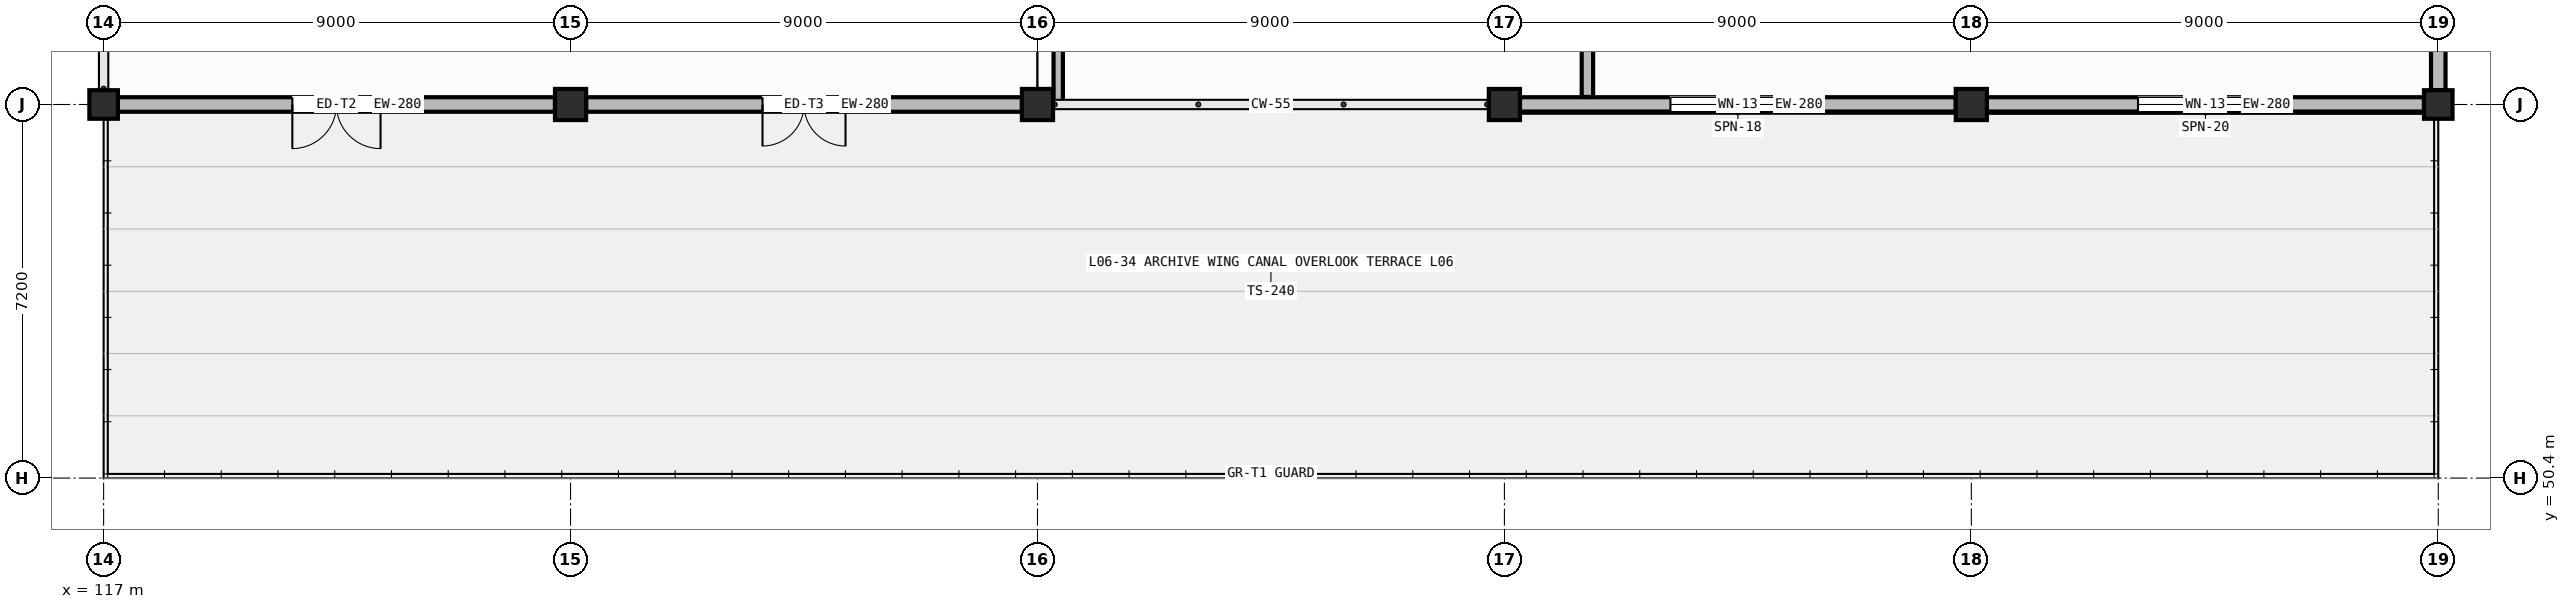
"""IFC4 building model, lengths in metres.
Left out: names, types, materials, properties, quantities, classifications, styles, units other than length and angle.
Written with IfcOpenShell. Run it as: python <this file> out.ifc"""

import sys

from ifc_helpers import new_model, si_unit, direction, frame, frame_2d, origin, origin_2d, place, context, subcontext, project, spatial, rectangle, hollow_rectangle, extrude, element, fill, save


model = new_model("IFC4")
c1 = context("Model", 3, precision=1e-05, world=origin(), true_north=direction((0.0, 1.0)))
c2 = subcontext(c1, "Body", "Model", "MODEL_VIEW")
j1 = project(units=[si_unit("LENGTHUNIT", "METRE"), si_unit("PLANEANGLEUNIT", "RADIAN")], contexts=[c1])
p1 = place(None, origin())
s1 = spatial("IfcSite", under=j1, at=p1, CompositionType="ELEMENT")
p2 = place(p1, origin())
s2 = spatial("IfcBuilding", under=s1, at=p2, CompositionType="ELEMENT")
p3 = place(p2, frame((0.0, 0.0, 20.6)))
s3 = spatial("IfcBuildingStorey", under=s2, at=p3, CompositionType="ELEMENT", Elevation=20.6)
p4 = place(p3, frame((117.0, 57.6, 0.0), z_axis=(0.0, 0.0, 1.0), x_axis=(1.0, 0.0, 0.0)))
e1 = element("IfcColumn", 1, at=p4, inside=s3, PredefinedType="COLUMN", context=c2, shape_type="SweptSolid", body=[
    extrude(hollow_rectangle(XDim=0.55, YDim=0.55, WallThickness=0.022, at=origin_2d()), origin(), (0.0, 0.0, 1.0), 3.36),
])
for number, where, z_axis, x_axis in (
    (2, (126.0, 57.6, 0.0), (0.0, 0.0, 1.0), (1.0, 0.0, 0.0)),
    (3, (135.0, 57.6, 0.0), (0.0, 0.0, 1.0), (1.0, 0.0, 0.0)),
    (4, (144.0, 57.6, 0.0), (0.0, 0.0, 1.0), (1.0, 0.0, 0.0)),
    (5, (153.0, 57.6, 0.0), (0.0, 0.0, 1.0), (1.0, 0.0, 0.0)),
):
    element("IfcColumn", number, at=place(p3, frame(where, z_axis=z_axis, x_axis=x_axis)), inside=s3, PredefinedType="COLUMN", context=c2, shape_type="SweptSolid", body=[
        extrude(hollow_rectangle(XDim=0.6, YDim=0.6, WallThickness=0.025, at=origin_2d()), origin(), (0.0, 0.0, 1.0), 3.6),
    ])
p5 = place(p3, frame((162.0, 57.6, 0.0), z_axis=(0.0, 0.0, 1.0), x_axis=(1.0, 0.0, 0.0)))
e6 = element("IfcColumn", 6, at=p5, inside=s3, PredefinedType="COLUMN", context=c2, shape_type="SweptSolid", body=[
    extrude(hollow_rectangle(XDim=0.55, YDim=0.55, WallThickness=0.022, at=origin_2d()), origin(), (0.0, 0.0, 1.0), 3.6),
])
p6 = place(p3, frame((117.275, 57.6, 0.0), z_axis=(0.0, 0.0, 1.0), x_axis=(1.0, 0.0, 0.0)))
e7 = element("IfcWall", 7, at=p6, inside=s3, PredefinedType="STANDARD", context=c2, shape_type="SweptSolid", body=[
    extrude(rectangle(XDim=8.425, YDim=0.28, at=frame_2d((4.212, 0.0))), origin(), (0.0, 0.0, 1.0), 2.96),
])
p7 = place(p6, frame((3.363, 0.0, 0.0)))
e8 = element("IfcOpeningElement", 8, at=p7, cuts=e7, PredefinedType="OPENING", context=c2, shape_type="SweptSolid", body=[
    extrude(rectangle(XDim=1.7, YDim=2.08, at=frame_2d((0.85, 1.04))), frame((0.0, 0.152, 0.0), z_axis=(0.0, -1.0, 0.0), x_axis=(1.0, 0.0, 0.0)), (0.0, 0.0, 1.0), 0.304),
])
p8 = place(p3, frame((126.3, 57.6, 0.0), z_axis=(0.0, 0.0, 1.0), x_axis=(1.0, 0.0, 0.0)))
e9 = element("IfcWall", 9, at=p8, inside=s3, PredefinedType="STANDARD", context=c2, shape_type="SweptSolid", body=[
    extrude(rectangle(XDim=8.4, YDim=0.28, at=frame_2d((4.2, 0.0))), origin(), (0.0, 0.0, 1.0), 2.92),
])
p9 = place(p8, frame((3.4, 0.0, 0.0)))
e10 = element("IfcOpeningElement", 10, at=p9, cuts=e9, PredefinedType="OPENING", context=c2, shape_type="SweptSolid", body=[
    extrude(rectangle(XDim=1.6, YDim=2.05, at=frame_2d((0.8, 1.025))), frame((0.0, 0.152, 0.0), z_axis=(0.0, -1.0, 0.0), x_axis=(1.0, 0.0, 0.0)), (0.0, 0.0, 1.0), 0.304),
])
p10 = place(p3, frame((144.3, 57.6, 0.0), z_axis=(0.0, 0.0, 1.0), x_axis=(1.0, 0.0, 0.0)))
e11 = element("IfcWall", 11, at=p10, inside=s3, PredefinedType="STANDARD", context=c2, shape_type="SweptSolid", body=[
    extrude(rectangle(XDim=8.4, YDim=0.28, at=frame_2d((4.2, 0.0))), origin(), (0.0, 0.0, 1.0), 2.92),
])
p11 = place(p10, frame((2.9, 0.0, 0.85)))
e12 = element("IfcOpeningElement", 12, at=p11, cuts=e11, PredefinedType="OPENING", context=c2, shape_type="SweptSolid", body=[
    extrude(rectangle(XDim=2.6, YDim=1.6, at=frame_2d((1.3, 0.8))), frame((0.0, 0.152, 0.0), z_axis=(0.0, -1.0, 0.0), x_axis=(1.0, 0.0, 0.0)), (0.0, 0.0, 1.0), 0.304),
])
p12 = place(p3, frame((153.3, 57.6, 0.0), z_axis=(0.0, 0.0, 1.0), x_axis=(1.0, 0.0, 0.0)))
e13 = element("IfcWall", 13, at=p12, inside=s3, PredefinedType="STANDARD", context=c2, shape_type="SweptSolid", body=[
    extrude(rectangle(XDim=8.425, YDim=0.28, at=frame_2d((4.212, 0.0))), origin(), (0.0, 0.0, 1.0), 2.92),
])
p13 = place(p12, frame((2.913, 0.0, 0.85)))
e14 = element("IfcOpeningElement", 14, at=p13, cuts=e13, PredefinedType="OPENING", context=c2, shape_type="SweptSolid", body=[
    extrude(rectangle(XDim=2.6, YDim=1.6, at=frame_2d((1.3, 0.8))), frame((0.0, 0.152, 0.0), z_axis=(0.0, -1.0, 0.0), x_axis=(1.0, 0.0, 0.0)), (0.0, 0.0, 1.0), 0.304),
])
p14 = place(p3, frame((162.0, 64.525, 0.0), z_axis=(0.0, 0.0, 1.0), x_axis=(0.0, -1.0, 0.0)))
e15 = element("IfcWall", 15, at=p14, inside=s3, PredefinedType="STANDARD", context=c2, shape_type="SweptSolid", body=[
    extrude(rectangle(XDim=6.65, YDim=0.28, at=frame_2d((3.325, 0.0))), origin(), (0.0, 0.0, 1.0), 2.92),
])
p15 = place(p14, frame((2.025, 0.0, 0.85)))
e16 = element("IfcOpeningElement", 16, at=p15, cuts=e15, PredefinedType="OPENING", context=c2, shape_type="SweptSolid", body=[
    extrude(rectangle(XDim=2.6, YDim=1.6, at=frame_2d((1.3, 0.8))), frame((0.0, 0.152, 0.0), z_axis=(0.0, -1.0, 0.0), x_axis=(1.0, 0.0, 0.0)), (0.0, 0.0, 1.0), 0.304),
])
p16 = place(p3, frame((135.4, 57.635, 0.0), z_axis=(0.0, 0.0, 1.0), x_axis=(0.0, 1.0, 0.0)))
e17 = element("IfcWall", 17, at=p16, inside=s3, PredefinedType="PARTITIONING", context=c2, shape_type="SweptSolid", body=[
    extrude(rectangle(XDim=7.675, YDim=0.18, at=frame_2d((3.837, 0.0))), origin(), (0.0, 0.0, 1.0), 3.32),
])
p17 = place(p16, frame((3.14, 0.0, 0.0)))
e18 = element("IfcOpeningElement", 18, at=p17, cuts=e17, PredefinedType="OPENING", context=c2, shape_type="SweptSolid", body=[
    extrude(rectangle(XDim=1.45, YDim=2.1, at=frame_2d((0.725, 1.05))), frame((0.0, 0.102, 0.0), z_axis=(0.0, -1.0, 0.0), x_axis=(1.0, 0.0, 0.0)), (0.0, 0.0, 1.0), 0.204),
])
p18 = place(p3, frame((145.6, 57.745, 0.0), z_axis=(0.0, 0.0, 1.0), x_axis=(0.0, 1.0, 0.0)))
e19 = element("IfcWall", 19, at=p18, inside=s3, PredefinedType="PARTITIONING", context=c2, shape_type="SweptSolid", body=[
    extrude(rectangle(XDim=16.565, YDim=0.22, at=frame_2d((8.282, 0.0))), origin(), (0.0, 0.0, 1.0), 3.32),
])
p19 = place(p18, frame((7.855, 0.0, 0.0)))
e20 = element("IfcOpeningElement", 20, at=p19, cuts=e19, PredefinedType="OPENING", context=c2, shape_type="SweptSolid", body=[
    extrude(rectangle(XDim=1.5, YDim=2.1, at=frame_2d((0.75, 1.05))), frame((0.0, 0.122, 0.0), z_axis=(0.0, -1.0, 0.0), x_axis=(1.0, 0.0, 0.0)), (0.0, 0.0, 1.0), 0.244),
])
p20 = place(p7, frame((1.7, 0.0, 0.0), z_axis=(0.0, 0.0, 1.0), x_axis=(-1.0, 0.0, 0.0)))
e21 = element("IfcDoor", 21, at=p20, inside=s3, OperationType="DOUBLE_DOOR_SINGLE_SWING", PredefinedType="DOOR", context=c2, shape_type="SweptSolid", body=[
    extrude(rectangle(XDim=1.7, YDim=2.08, at=frame_2d((0.85, 1.04))), frame((0.0, 0.025, 0.0), z_axis=(0.0, -1.0, 0.0), x_axis=(1.0, 0.0, 0.0)), (0.0, 0.0, 1.0), 0.05),
])
fill(e8, e21)
p21 = place(p9, frame((1.6, 0.0, 0.0), z_axis=(0.0, 0.0, 1.0), x_axis=(-1.0, 0.0, 0.0)))
e22 = element("IfcDoor", 22, at=p21, inside=s3, OperationType="DOUBLE_DOOR_SINGLE_SWING", PredefinedType="DOOR", context=c2, shape_type="SweptSolid", body=[
    extrude(rectangle(XDim=1.6, YDim=2.05, at=frame_2d((0.8, 1.025))), frame((0.0, 0.025, 0.0), z_axis=(0.0, -1.0, 0.0), x_axis=(1.0, 0.0, 0.0)), (0.0, 0.0, 1.0), 0.05),
])
fill(e10, e22)
p22 = place(p11, origin())
e23 = element("IfcWindow", 23, at=p22, inside=s3, PartitioningType="DOUBLE_PANEL_VERTICAL", PredefinedType="WINDOW", context=c2, shape_type="SweptSolid", body=[
    extrude(rectangle(XDim=2.6, YDim=1.6, at=frame_2d((1.3, 0.8))), frame((0.0, 0.03, 0.0), z_axis=(0.0, -1.0, 0.0), x_axis=(1.0, 0.0, 0.0)), (0.0, 0.0, 1.0), 0.06),
])
fill(e12, e23)
p23 = place(p13, origin())
e24 = element("IfcWindow", 24, at=p23, inside=s3, PartitioningType="DOUBLE_PANEL_VERTICAL", PredefinedType="WINDOW", context=c2, shape_type="SweptSolid", body=[
    extrude(rectangle(XDim=2.6, YDim=1.6, at=frame_2d((1.3, 0.8))), frame((0.0, 0.03, 0.0), z_axis=(0.0, -1.0, 0.0), x_axis=(1.0, 0.0, 0.0)), (0.0, 0.0, 1.0), 0.06),
])
fill(e14, e24)
save(model, sys.argv[1])
